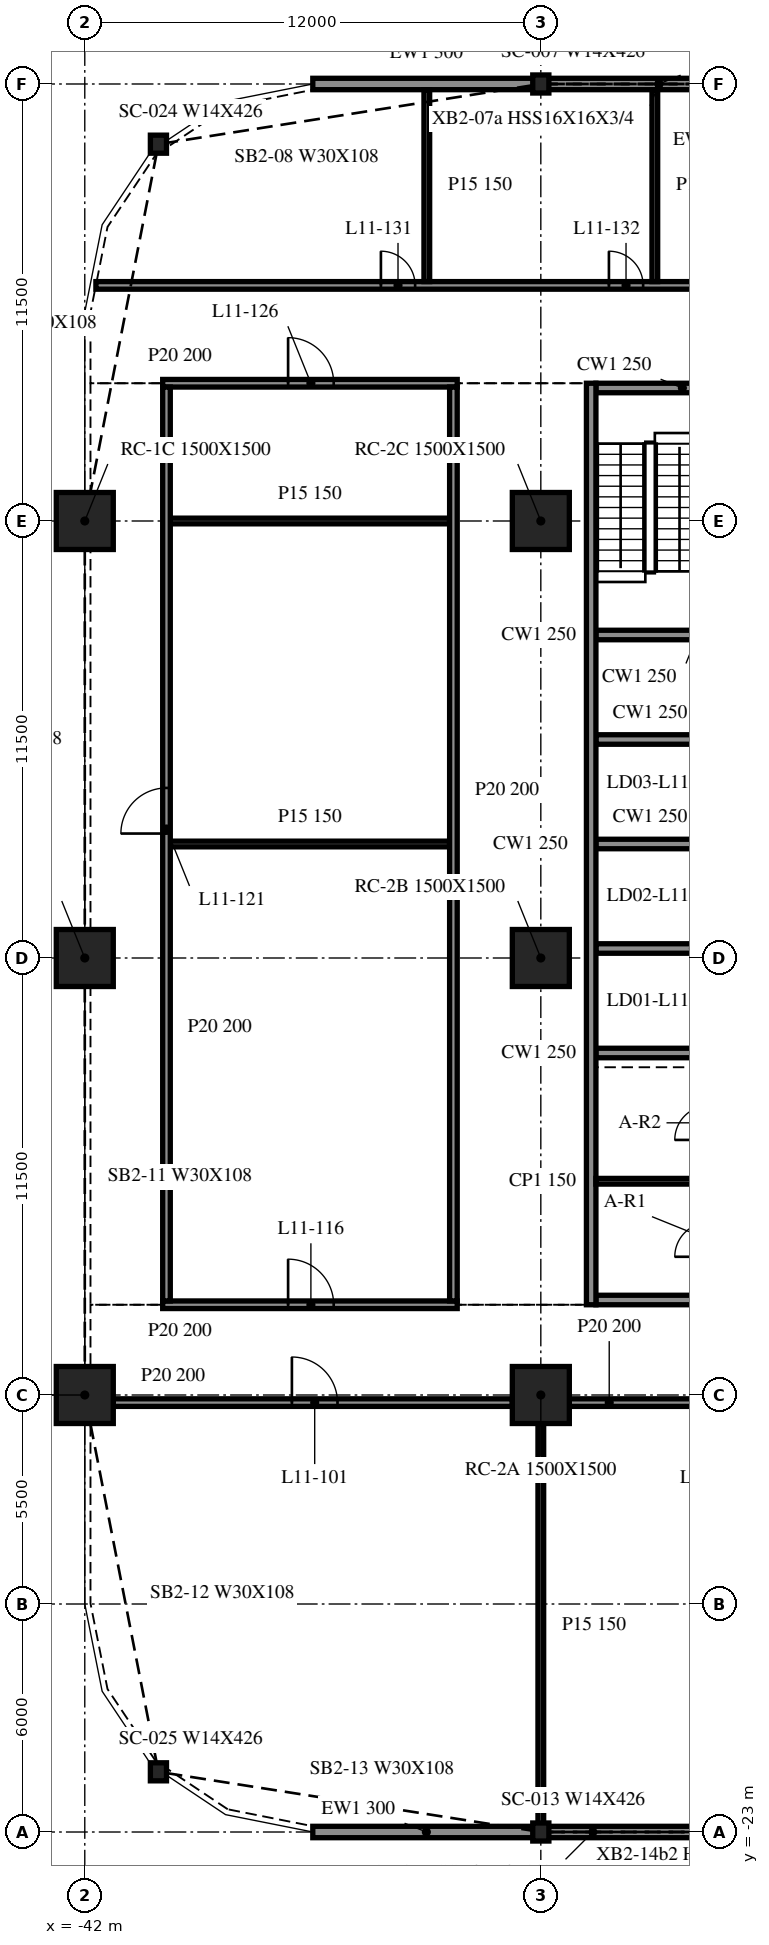
"""IFC4 building model, lengths in metres.
Left out: names, types, materials, properties, quantities, classifications, styles, units other than length and angle.
Written with IfcOpenShell. Run it as: python <this file> out.ifc"""

import sys

from ifc_helpers import new_model, si_unit, direction, frame, frame_2d, origin, origin_2d, place, context, subcontext, project, spatial, rectangle, i_section, extrude, element, fill, save


model = new_model("IFC4")
c1 = context("Model", 3, precision=1e-05, world=origin(), true_north=direction((0.0, 1.0)))
c2 = subcontext(c1, "Body", "Model", "MODEL_VIEW")
j1 = project(units=[si_unit("LENGTHUNIT", "METRE"), si_unit("PLANEANGLEUNIT", "RADIAN")], contexts=[c1])
p1 = place(None, origin())
s1 = spatial("IfcSite", under=j1, at=p1, CompositionType="ELEMENT")
p2 = place(p1, origin())
s2 = spatial("IfcBuilding", under=s1, at=p2, CompositionType="ELEMENT")
p3 = place(p2, frame((0.0, 0.0, 50.3)))
s3 = spatial("IfcBuildingStorey", under=s2, at=p3, CompositionType="ELEMENT", Elevation=50.3)
for number, where, z_axis, x_axis in (
    (1, (-42.0, -11.5, -0.34), (0.0, 0.0, 1.0), (1.0, 0.0, 0.0)),
    (2, (-42.0, 0.0, -0.34), (0.0, 0.0, 1.0), (1.0, 0.0, 0.0)),
    (3, (-42.0, 11.5, -0.34), (0.0, 0.0, 1.0), (1.0, 0.0, 0.0)),
    (4, (-30.0, -11.5, -0.34), (0.0, 0.0, 1.0), (1.0, 0.0, 0.0)),
    (5, (-30.0, 0.0, -0.34), (0.0, 0.0, 1.0), (1.0, 0.0, 0.0)),
    (6, (-30.0, 11.5, -0.34), (0.0, 0.0, 1.0), (1.0, 0.0, 0.0)),
):
    element("IfcColumn", number, at=place(p3, frame(where, z_axis=z_axis, x_axis=x_axis)), inside=s3, PredefinedType="COLUMN", context=c2, shape_type="SweptSolid", body=[
        extrude(rectangle(XDim=1.5, YDim=1.5, at=origin_2d()), origin(), (0.0, 0.0, 1.0), 4.3),
    ])
for number, where, z_axis, x_axis in (
    (7, (-30.0, 23.0, -0.34), (0.0, 0.0, 1.0), (1.0, 0.0, 0.0)),
    (8, (-40.062, 21.416, -0.34), (0.0, 0.0, 1.0), (1.0, 0.0, 0.0)),
    (9, (-40.062, -21.416, -0.34), (0.0, 0.0, 1.0), (1.0, 0.0, 0.0)),
    (10, (-30.0, -23.0, -0.34), (0.0, 0.0, 1.0), (1.0, 0.0, 0.0)),
):
    element("IfcColumn", number, at=place(p3, frame(where, z_axis=z_axis, x_axis=x_axis)), inside=s3, PredefinedType="COLUMN", context=c2, shape_type="SweptSolid", body=[
        extrude(i_section(OverallWidth=0.424, OverallDepth=0.475, WebThickness=0.048, FlangeThickness=0.077, at=origin_2d()), origin(), (0.0, 0.0, 1.0), 4.3),
    ])
p4 = place(p3, frame((-18.024, 23.0, 0.0), z_axis=(0.0, 0.0, 1.0), x_axis=(-1.0, 0.0, 0.0)))
e11 = element("IfcWall", 11, at=p4, inside=s3, PredefinedType="NOTDEFINED", context=c2, shape_type="SweptSolid", body=[
    extrude(rectangle(XDim=11.952, YDim=0.3, at=frame_2d((5.976, 0.0))), origin(), (0.0, 0.0, 1.0), 3.203),
])
for number, where, z_axis, x_axis in (
    (12, (-30.024, 23.0, 0.0), (0.0, 0.0, 1.0), (-1.0, 0.0, 0.0)),
    (13, (-36.0, -23.0, 0.0), (0.0, 0.0, 1.0), (1.0, 0.0, 0.0)),
):
    element("IfcWall", number, at=place(p3, frame(where, z_axis=z_axis, x_axis=x_axis)), inside=s3, PredefinedType="NOTDEFINED", context=c2, shape_type="SweptSolid", body=[
        extrude(rectangle(XDim=5.976, YDim=0.3, at=frame_2d((2.988, 0.0))), origin(), (0.0, 0.0, 1.0), 3.203),
    ])
p5 = place(p3, frame((-29.976, -23.0, 0.0), z_axis=(0.0, 0.0, 1.0), x_axis=(1.0, 0.0, 0.0)))
e14 = element("IfcWall", 14, at=p5, inside=s3, PredefinedType="NOTDEFINED", context=c2, shape_type="SweptSolid", body=[
    extrude(rectangle(XDim=11.952, YDim=0.3, at=frame_2d((5.976, 0.0))), origin(), (0.0, 0.0, 1.0), 3.203),
])
p6 = place(p3, frame((-28.675, 15.125, 0.0), z_axis=(0.0, 0.0, 1.0), x_axis=(0.0, -1.0, 0.0)))
e15 = element("IfcWall", 15, at=p6, inside=s3, PredefinedType="SOLIDWALL", context=c2, shape_type="SweptSolid", body=[
    extrude(rectangle(XDim=24.25, YDim=0.25, at=frame_2d((12.125, 0.0))), origin(), (0.0, 0.0, 1.0), 3.96),
])
p7 = place(p3, frame((-19.45, -9.0, 0.0), z_axis=(0.0, 0.0, 1.0), x_axis=(-1.0, 0.0, 0.0)))
e16 = element("IfcWall", 16, at=p7, inside=s3, PredefinedType="SOLIDWALL", context=c2, shape_type="SweptSolid", body=[
    extrude(rectangle(XDim=9.1, YDim=0.25, at=frame_2d((4.55, 0.0))), origin(), (0.0, 0.0, 1.0), 3.96),
])
p8 = place(p7, frame((3.65, 0.0, 0.0)))
e17 = element("IfcOpeningElement", 17, at=p8, cuts=e16, PredefinedType="OPENING", context=c2, shape_type="SweptSolid", body=[
    extrude(rectangle(XDim=1.8, YDim=2.1, at=frame_2d((0.9, 1.05))), frame((0.0, 0.135, 0.0), z_axis=(0.0, -1.0, 0.0), x_axis=(1.0, 0.0, 0.0)), (0.0, 0.0, 1.0), 0.27),
])
p9 = place(p3, frame((-28.55, 15.0, 0.0), z_axis=(0.0, 0.0, 1.0), x_axis=(1.0, 0.0, 0.0)))
e18 = element("IfcWall", 18, at=p9, inside=s3, PredefinedType="SOLIDWALL", context=c2, shape_type="SweptSolid", body=[
    extrude(rectangle(XDim=9.1, YDim=0.25, at=frame_2d((4.55, 0.0))), origin(), (0.0, 0.0, 1.0), 3.96),
])
p10 = place(p9, frame((3.65, 0.0, 0.0)))
e19 = element("IfcOpeningElement", 19, at=p10, cuts=e18, PredefinedType="OPENING", context=c2, shape_type="SweptSolid", body=[
    extrude(rectangle(XDim=1.8, YDim=2.1, at=frame_2d((0.9, 1.05))), frame((0.0, 0.135, 0.0), z_axis=(0.0, -1.0, 0.0), x_axis=(1.0, 0.0, 0.0)), (0.0, 0.0, 1.0), 0.27),
])
for number, where, z_axis, x_axis in (
    (20, (-28.55, -2.5, 0.0), (0.0, 0.0, 1.0), (1.0, 0.0, 0.0)),
    (21, (-28.55, 0.25, 0.0), (0.0, 0.0, 1.0), (1.0, 0.0, 0.0)),
    (22, (-28.55, 3.0, 0.0), (0.0, 0.0, 1.0), (1.0, 0.0, 0.0)),
    (23, (-28.55, 5.75, 0.0), (0.0, 0.0, 1.0), (1.0, 0.0, 0.0)),
    (24, (-28.55, 8.5, 0.0), (0.0, 0.0, 1.0), (1.0, 0.0, 0.0)),
):
    element("IfcWall", number, at=place(p3, frame(where, z_axis=z_axis, x_axis=x_axis)), inside=s3, PredefinedType="SOLIDWALL", context=c2, shape_type="SweptSolid", body=[
        extrude(rectangle(XDim=2.85, YDim=0.25, at=frame_2d((1.425, 0.0))), origin(), (0.0, 0.0, 1.0), 3.96),
    ])
p11 = place(p3, frame((-28.55, -5.875, 0.0), z_axis=(0.0, 0.0, 1.0), x_axis=(1.0, 0.0, 0.0)))
e25 = element("IfcWall", 25, at=p11, inside=s3, PredefinedType="PARTITIONING", context=c2, shape_type="SweptSolid", body=[
    extrude(rectangle(XDim=2.85, YDim=0.15, at=frame_2d((1.425, 0.0))), origin(), (0.0, 0.0, 1.0), 3.96),
])
p12 = place(p3, frame((-41.25, -11.7, 0.0), z_axis=(0.0, 0.0, 1.0), x_axis=(1.0, 0.0, 0.0)))
e26 = element("IfcWall", 26, at=p12, inside=s3, PredefinedType="PARTITIONING", context=c2, shape_type="SweptSolid", body=[
    extrude(rectangle(XDim=10.5, YDim=0.2, at=frame_2d((5.25, 0.0))), origin(), (0.0, 0.0, 1.0), 3.96),
])
p13 = place(p12, frame((4.7, 0.0, 0.0)))
e27 = element("IfcOpeningElement", 27, at=p13, cuts=e26, PredefinedType="OPENING", context=c2, shape_type="SweptSolid", body=[
    extrude(rectangle(XDim=1.2, YDim=2.1, at=frame_2d((0.6, 1.05))), frame((0.0, 0.11, 0.0), z_axis=(0.0, -1.0, 0.0), x_axis=(1.0, 0.0, 0.0)), (0.0, 0.0, 1.0), 0.22),
])
p14 = place(p3, frame((-29.25, -11.7, 0.0), z_axis=(0.0, 0.0, 1.0), x_axis=(1.0, 0.0, 0.0)))
e28 = element("IfcWall", 28, at=p14, inside=s3, PredefinedType="PARTITIONING", context=c2, shape_type="SweptSolid", body=[
    extrude(rectangle(XDim=10.5, YDim=0.2, at=frame_2d((5.25, 0.0))), origin(), (0.0, 0.0, 1.0), 3.96),
])
p15 = place(p14, frame((3.7, 0.0, 0.0)))
e29 = element("IfcOpeningElement", 29, at=p15, cuts=e28, PredefinedType="OPENING", context=c2, shape_type="SweptSolid", body=[
    extrude(rectangle(XDim=1.2, YDim=2.1, at=frame_2d((0.6, 1.05))), frame((0.0, 0.11, 0.0), z_axis=(0.0, -1.0, 0.0), x_axis=(1.0, 0.0, 0.0)), (0.0, 0.0, 1.0), 0.22),
])
p16 = place(p14, frame((5.5, 0.0, 0.0)))
e30 = element("IfcOpeningElement", 30, at=p16, cuts=e28, PredefinedType="OPENING", context=c2, shape_type="SweptSolid", body=[
    extrude(rectangle(XDim=1.2, YDim=2.1, at=frame_2d((0.6, 1.05))), frame((0.0, 0.11, 0.0), z_axis=(0.0, -1.0, 0.0), x_axis=(1.0, 0.0, 0.0)), (0.0, 0.0, 1.0), 0.22),
])
p17 = place(p3, frame((-39.95, -9.125, 0.0), z_axis=(0.0, 0.0, 1.0), x_axis=(1.0, 0.0, 0.0)))
e31 = element("IfcWall", 31, at=p17, inside=s3, PredefinedType="PARTITIONING", context=c2, shape_type="SweptSolid", body=[
    extrude(rectangle(XDim=7.75, YDim=0.2, at=frame_2d((3.875, 0.0))), origin(), (0.0, 0.0, 1.0), 3.96),
])
p18 = place(p17, frame((3.3, 0.0, 0.0)))
e32 = element("IfcOpeningElement", 32, at=p18, cuts=e31, PredefinedType="OPENING", context=c2, shape_type="SweptSolid", body=[
    extrude(rectangle(XDim=1.2, YDim=2.1, at=frame_2d((0.6, 1.05))), frame((0.0, 0.11, 0.0), z_axis=(0.0, -1.0, 0.0), x_axis=(1.0, 0.0, 0.0)), (0.0, 0.0, 1.0), 0.22),
])
for number, where, z_axis, x_axis in (
    (33, (-39.75, 3.0, 0.0), (0.0, 0.0, 1.0), (1.0, 0.0, 0.0)),
    (34, (-39.75, 11.5, 0.0), (0.0, 0.0, 1.0), (1.0, 0.0, 0.0)),
):
    element("IfcWall", number, at=place(p3, frame(where, z_axis=z_axis, x_axis=x_axis)), inside=s3, PredefinedType="PARTITIONING", context=c2, shape_type="SweptSolid", body=[
        extrude(rectangle(XDim=7.35, YDim=0.15, at=frame_2d((3.675, 0.0))), origin(), (0.0, 0.0, 1.0), 3.96),
    ])
p19 = place(p3, frame((-39.95, 15.125, 0.0), z_axis=(0.0, 0.0, 1.0), x_axis=(1.0, 0.0, 0.0)))
e35 = element("IfcWall", 35, at=p19, inside=s3, PredefinedType="PARTITIONING", context=c2, shape_type="SweptSolid", body=[
    extrude(rectangle(XDim=7.75, YDim=0.2, at=frame_2d((3.875, 0.0))), origin(), (0.0, 0.0, 1.0), 3.96),
])
p20 = place(p19, frame((3.3, 0.0, 0.0)))
e36 = element("IfcOpeningElement", 36, at=p20, cuts=e35, PredefinedType="OPENING", context=c2, shape_type="SweptSolid", body=[
    extrude(rectangle(XDim=1.2, YDim=2.1, at=frame_2d((0.6, 1.05))), frame((0.0, 0.11, 0.0), z_axis=(0.0, -1.0, 0.0), x_axis=(1.0, 0.0, 0.0)), (0.0, 0.0, 1.0), 0.22),
])
p21 = place(p3, frame((-41.708, 17.7, 0.0), z_axis=(0.0, 0.0, 1.0), x_axis=(1.0, 0.0, 0.0)))
e37 = element("IfcWall", 37, at=p21, inside=s3, PredefinedType="PARTITIONING", context=c2, shape_type="SweptSolid", body=[
    extrude(rectangle(XDim=95.416, YDim=0.2, at=frame_2d((47.708, 0.0))), origin(), (0.0, 0.0, 1.0), 3.96),
])
p22 = place(p21, frame((7.5, 0.0, 0.0)))
e38 = element("IfcOpeningElement", 38, at=p22, cuts=e37, PredefinedType="OPENING", context=c2, shape_type="SweptSolid", body=[
    extrude(rectangle(XDim=0.9, YDim=2.1, at=frame_2d((0.45, 1.05))), frame((0.0, 0.11, 0.0), z_axis=(0.0, -1.0, 0.0), x_axis=(1.0, 0.0, 0.0)), (0.0, 0.0, 1.0), 0.22),
])
p23 = place(p21, frame((13.5, 0.0, 0.0)))
e39 = element("IfcOpeningElement", 39, at=p23, cuts=e37, PredefinedType="OPENING", context=c2, shape_type="SweptSolid", body=[
    extrude(rectangle(XDim=0.9, YDim=2.1, at=frame_2d((0.45, 1.05))), frame((0.0, 0.11, 0.0), z_axis=(0.0, -1.0, 0.0), x_axis=(1.0, 0.0, 0.0)), (0.0, 0.0, 1.0), 0.22),
])
p24 = place(p21, frame((19.5, 0.0, 0.0)))
e40 = element("IfcOpeningElement", 40, at=p24, cuts=e37, PredefinedType="OPENING", context=c2, shape_type="SweptSolid", body=[
    extrude(rectangle(XDim=0.9, YDim=2.1, at=frame_2d((0.45, 1.05))), frame((0.0, 0.11, 0.0), z_axis=(0.0, -1.0, 0.0), x_axis=(1.0, 0.0, 0.0)), (0.0, 0.0, 1.0), 0.22),
])
p25 = place(p21, frame((31.5, 0.0, 0.0)))
e41 = element("IfcOpeningElement", 41, at=p25, cuts=e37, PredefinedType="OPENING", context=c2, shape_type="SweptSolid", body=[
    extrude(rectangle(XDim=0.9, YDim=2.1, at=frame_2d((0.45, 1.05))), frame((0.0, 0.11, 0.0), z_axis=(0.0, -1.0, 0.0), x_axis=(1.0, 0.0, 0.0)), (0.0, 0.0, 1.0), 0.22),
])
p26 = place(p21, frame((34.5, 0.0, 0.0)))
e42 = element("IfcOpeningElement", 42, at=p26, cuts=e37, PredefinedType="OPENING", context=c2, shape_type="SweptSolid", body=[
    extrude(rectangle(XDim=0.9, YDim=2.1, at=frame_2d((0.45, 1.05))), frame((0.0, 0.11, 0.0), z_axis=(0.0, -1.0, 0.0), x_axis=(1.0, 0.0, 0.0)), (0.0, 0.0, 1.0), 0.22),
])
p27 = place(p21, frame((43.5, 0.0, 0.0)))
e43 = element("IfcOpeningElement", 43, at=p27, cuts=e37, PredefinedType="OPENING", context=c2, shape_type="SweptSolid", body=[
    extrude(rectangle(XDim=0.9, YDim=2.1, at=frame_2d((0.45, 1.05))), frame((0.0, 0.11, 0.0), z_axis=(0.0, -1.0, 0.0), x_axis=(1.0, 0.0, 0.0)), (0.0, 0.0, 1.0), 0.22),
])
p28 = place(p21, frame((47.3, 0.0, 0.0)))
e44 = element("IfcOpeningElement", 44, at=p28, cuts=e37, PredefinedType="OPENING", context=c2, shape_type="SweptSolid", body=[
    extrude(rectangle(XDim=0.9, YDim=2.1, at=frame_2d((0.45, 1.05))), frame((0.0, 0.11, 0.0), z_axis=(0.0, -1.0, 0.0), x_axis=(1.0, 0.0, 0.0)), (0.0, 0.0, 1.0), 0.22),
])
p29 = place(p21, frame((51.1, 0.0, 0.0)))
e45 = element("IfcOpeningElement", 45, at=p29, cuts=e37, PredefinedType="OPENING", context=c2, shape_type="SweptSolid", body=[
    extrude(rectangle(XDim=0.9, YDim=2.1, at=frame_2d((0.45, 1.05))), frame((0.0, 0.11, 0.0), z_axis=(0.0, -1.0, 0.0), x_axis=(1.0, 0.0, 0.0)), (0.0, 0.0, 1.0), 0.22),
])
p30 = place(p21, frame((57.1, 0.0, 0.0)))
e46 = element("IfcOpeningElement", 46, at=p30, cuts=e37, PredefinedType="OPENING", context=c2, shape_type="SweptSolid", body=[
    extrude(rectangle(XDim=0.9, YDim=2.1, at=frame_2d((0.45, 1.05))), frame((0.0, 0.11, 0.0), z_axis=(0.0, -1.0, 0.0), x_axis=(1.0, 0.0, 0.0)), (0.0, 0.0, 1.0), 0.22),
])
p31 = place(p21, frame((69.1, 0.0, 0.0)))
e47 = element("IfcOpeningElement", 47, at=p31, cuts=e37, PredefinedType="OPENING", context=c2, shape_type="SweptSolid", body=[
    extrude(rectangle(XDim=0.9, YDim=2.1, at=frame_2d((0.45, 1.05))), frame((0.0, 0.11, 0.0), z_axis=(0.0, -1.0, 0.0), x_axis=(1.0, 0.0, 0.0)), (0.0, 0.0, 1.0), 0.22),
])
p32 = place(p21, frame((72.1, 0.0, 0.0)))
e48 = element("IfcOpeningElement", 48, at=p32, cuts=e37, PredefinedType="OPENING", context=c2, shape_type="SweptSolid", body=[
    extrude(rectangle(XDim=0.9, YDim=2.1, at=frame_2d((0.45, 1.05))), frame((0.0, 0.11, 0.0), z_axis=(0.0, -1.0, 0.0), x_axis=(1.0, 0.0, 0.0)), (0.0, 0.0, 1.0), 0.22),
])
p33 = place(p21, frame((81.1, 0.0, 0.0)))
e49 = element("IfcOpeningElement", 49, at=p33, cuts=e37, PredefinedType="OPENING", context=c2, shape_type="SweptSolid", body=[
    extrude(rectangle(XDim=0.9, YDim=2.1, at=frame_2d((0.45, 1.05))), frame((0.0, 0.11, 0.0), z_axis=(0.0, -1.0, 0.0), x_axis=(1.0, 0.0, 0.0)), (0.0, 0.0, 1.0), 0.22),
])
p34 = place(p21, frame((87.1, 0.0, 0.0)))
e50 = element("IfcOpeningElement", 50, at=p34, cuts=e37, PredefinedType="OPENING", context=c2, shape_type="SweptSolid", body=[
    extrude(rectangle(XDim=0.9, YDim=2.1, at=frame_2d((0.45, 1.05))), frame((0.0, 0.11, 0.0), z_axis=(0.0, -1.0, 0.0), x_axis=(1.0, 0.0, 0.0)), (0.0, 0.0, 1.0), 0.22),
])
p35 = place(p3, frame((-39.85, -9.025, 0.0), z_axis=(0.0, 0.0, 1.0), x_axis=(0.0, 1.0, 0.0)))
e51 = element("IfcWall", 51, at=p35, inside=s3, PredefinedType="PARTITIONING", context=c2, shape_type="SweptSolid", body=[
    extrude(rectangle(XDim=24.05, YDim=0.2, at=frame_2d((12.025, 0.0))), origin(), (0.0, 0.0, 1.0), 3.96),
])
p36 = place(p35, frame((12.3, 0.0, 0.0)))
e52 = element("IfcOpeningElement", 52, at=p36, cuts=e51, PredefinedType="OPENING", context=c2, shape_type="SweptSolid", body=[
    extrude(rectangle(XDim=1.2, YDim=2.1, at=frame_2d((0.6, 1.05))), frame((0.0, 0.11, 0.0), z_axis=(0.0, -1.0, 0.0), x_axis=(1.0, 0.0, 0.0)), (0.0, 0.0, 1.0), 0.22),
])
p37 = place(p3, frame((-33.0, 17.8, 0.0), z_axis=(0.0, 0.0, 1.0), x_axis=(0.0, 1.0, 0.0)))
e53 = element("IfcWall", 53, at=p37, inside=s3, PredefinedType="PARTITIONING", context=c2, shape_type="SweptSolid", body=[
    extrude(rectangle(XDim=5.05, YDim=0.15, at=frame_2d((2.525, 0.0))), origin(), (0.0, 0.0, 1.0), 3.96),
])
p38 = place(p3, frame((-32.3, -9.025, 0.0), z_axis=(0.0, 0.0, 1.0), x_axis=(0.0, 1.0, 0.0)))
e54 = element("IfcWall", 54, at=p38, inside=s3, PredefinedType="PARTITIONING", context=c2, shape_type="SweptSolid", body=[
    extrude(rectangle(XDim=24.05, YDim=0.2, at=frame_2d((12.025, 0.0))), origin(), (0.0, 0.0, 1.0), 3.96),
])
p39 = place(p3, frame((-30.0, -22.85, 0.0), z_axis=(0.0, 0.0, 1.0), x_axis=(0.0, 1.0, 0.0)))
e55 = element("IfcWall", 55, at=p39, inside=s3, PredefinedType="PARTITIONING", context=c2, shape_type="SweptSolid", body=[
    extrude(rectangle(XDim=10.6, YDim=0.15, at=frame_2d((5.3, 0.0))), origin(), (0.0, 0.0, 1.0), 3.96),
])
p40 = place(p3, frame((-27.0, 17.8, 0.0), z_axis=(0.0, 0.0, 1.0), x_axis=(0.0, 1.0, 0.0)))
e56 = element("IfcWall", 56, at=p40, inside=s3, PredefinedType="PARTITIONING", context=c2, shape_type="SweptSolid", body=[
    extrude(rectangle(XDim=5.05, YDim=0.15, at=frame_2d((2.525, 0.0))), origin(), (0.0, 0.0, 1.0), 3.96),
])
p41 = place(p13, origin())
e57 = element("IfcDoor", 57, at=p41, inside=s3, OperationType="SINGLE_SWING_LEFT", PredefinedType="DOOR", context=c2, shape_type="SweptSolid", body=[
    extrude(rectangle(XDim=1.2, YDim=2.1, at=frame_2d((0.6, 1.05))), frame((0.0, 0.025, 0.0), z_axis=(0.0, -1.0, 0.0), x_axis=(1.0, 0.0, 0.0)), (0.0, 0.0, 1.0), 0.05),
])
fill(e27, e57)
p42 = place(p18, origin())
e58 = element("IfcDoor", 58, at=p42, inside=s3, OperationType="SINGLE_SWING_RIGHT", PredefinedType="DOOR", context=c2, shape_type="SweptSolid", body=[
    extrude(rectangle(XDim=1.2, YDim=2.1, at=frame_2d((0.6, 1.05))), frame((0.0, 0.025, 0.0), z_axis=(0.0, -1.0, 0.0), x_axis=(1.0, 0.0, 0.0)), (0.0, 0.0, 1.0), 0.05),
])
fill(e32, e58)
p43 = place(p36, origin())
e59 = element("IfcDoor", 59, at=p43, inside=s3, OperationType="SINGLE_SWING_LEFT", PredefinedType="DOOR", context=c2, shape_type="SweptSolid", body=[
    extrude(rectangle(XDim=1.2, YDim=2.1, at=frame_2d((0.6, 1.05))), frame((0.0, 0.025, 0.0), z_axis=(0.0, -1.0, 0.0), x_axis=(1.0, 0.0, 0.0)), (0.0, 0.0, 1.0), 0.05),
])
fill(e52, e59)
p44 = place(p20, origin())
e60 = element("IfcDoor", 60, at=p44, inside=s3, OperationType="SINGLE_SWING_LEFT", PredefinedType="DOOR", context=c2, shape_type="SweptSolid", body=[
    extrude(rectangle(XDim=1.2, YDim=2.1, at=frame_2d((0.6, 1.05))), frame((0.0, 0.025, 0.0), z_axis=(0.0, -1.0, 0.0), x_axis=(1.0, 0.0, 0.0)), (0.0, 0.0, 1.0), 0.05),
])
fill(e36, e60)
p45 = place(p22, origin())
e61 = element("IfcDoor", 61, at=p45, inside=s3, OperationType="SINGLE_SWING_LEFT", PredefinedType="DOOR", context=c2, shape_type="SweptSolid", body=[
    extrude(rectangle(XDim=0.9, YDim=2.1, at=frame_2d((0.45, 1.05))), frame((0.0, 0.025, 0.0), z_axis=(0.0, -1.0, 0.0), x_axis=(1.0, 0.0, 0.0)), (0.0, 0.0, 1.0), 0.05),
])
fill(e38, e61)
p46 = place(p23, origin())
e62 = element("IfcDoor", 62, at=p46, inside=s3, OperationType="SINGLE_SWING_LEFT", PredefinedType="DOOR", context=c2, shape_type="SweptSolid", body=[
    extrude(rectangle(XDim=0.9, YDim=2.1, at=frame_2d((0.45, 1.05))), frame((0.0, 0.025, 0.0), z_axis=(0.0, -1.0, 0.0), x_axis=(1.0, 0.0, 0.0)), (0.0, 0.0, 1.0), 0.05),
])
fill(e39, e62)
save(model, sys.argv[1])
